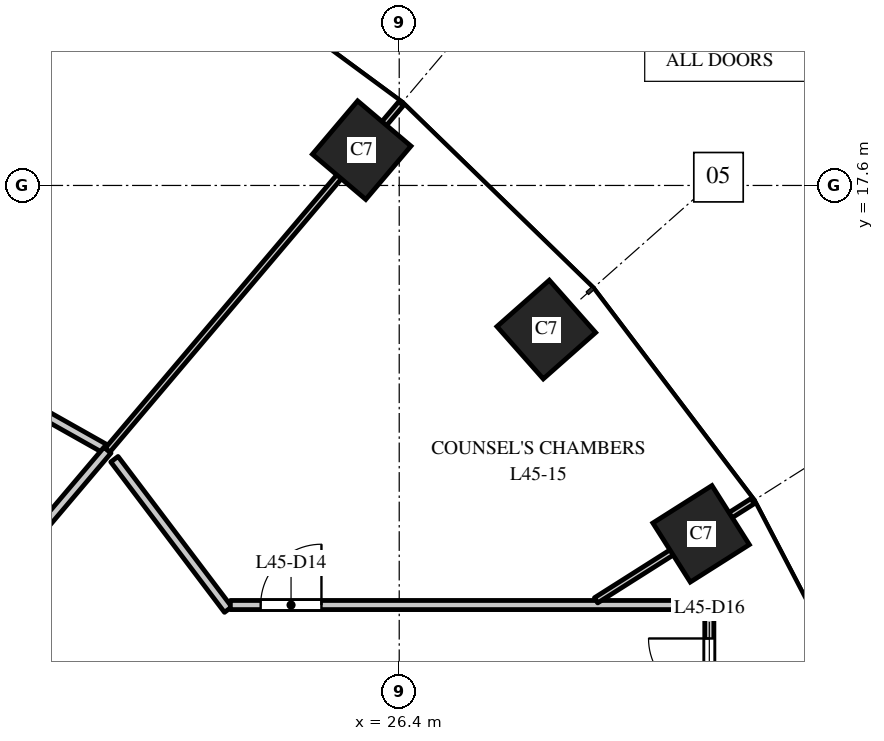
"""IFC4 building model, lengths in metres.
Left out: names, types, materials, properties, quantities, classifications, styles, units other than length and angle.
Written with IfcOpenShell. Run it as: python <this file> out.ifc"""

import sys

from ifc_helpers import new_model, si_unit, direction, frame, frame_2d, origin, origin_2d, place, context, subcontext, project, spatial, rectangle, extrude, element, fill, save


model = new_model("IFC4")
c1 = context("Model", 3, precision=1e-05, world=origin(), true_north=direction((0.0, 1.0)))
c2 = subcontext(c1, "Body", "Model", "MODEL_VIEW")
j1 = project(units=[si_unit("LENGTHUNIT", "METRE"), si_unit("PLANEANGLEUNIT", "RADIAN")], contexts=[c1])
p1 = place(None, origin())
s1 = spatial("IfcSite", under=j1, at=p1, CompositionType="ELEMENT")
p2 = place(p1, origin())
s2 = spatial("IfcBuilding", under=s1, at=p2, CompositionType="ELEMENT")
p3 = place(p2, frame((0.0, 0.0, 194.0)))
s3 = spatial("IfcBuildingStorey", under=s2, at=p3, CompositionType="ELEMENT", Elevation=194.0)
for number, where, z_axis, x_axis in (
    (1, (31.365, 11.871, 0.0), (0.0, 0.0, 1.0), (-0.535, 0.845, 0.0)),
    (2, (28.819, 15.23, 0.0), (0.0, 0.0, 1.0), (-0.663, 0.749, 0.0)),
    (3, (25.783, 18.18, 0.0), (0.0, 0.0, 1.0), (-0.763, 0.646, 0.0)),
):
    element("IfcColumn", number, at=place(p3, frame(where, z_axis=z_axis, x_axis=x_axis)), inside=s3, PredefinedType="COLUMN", context=c2, shape_type="SweptSolid", body=[
        extrude(rectangle(XDim=1.15, YDim=1.15, at=origin_2d()), origin(), (0.0, 0.0, 1.0), 4.0),
    ])
p4 = place(p3, frame((12.711, 18.258, 0.0), z_axis=(0.0, 0.0, 1.0), x_axis=(0.871190713924, -0.490944742279, 0.0)))
e4 = element("IfcWall", 4, at=p4, inside=s3, PredefinedType="PARTITIONING", context=c2, shape_type="SweptSolid", body=[
    extrude(rectangle(XDim=10.207, YDim=0.15, at=frame_2d((5.104, 0.0))), origin(), (0.0, 0.0, 1.0), 3.7),
])
p5 = place(p3, frame((19.511, 10.778, 0.0), z_axis=(0.0, 0.0, 1.0), x_axis=(0.646314086505, 0.763071491792, 0.0)))
e5 = element("IfcWall", 5, at=p5, inside=s3, PredefinedType="PARTITIONING", context=c2, shape_type="SweptSolid", body=[
    extrude(rectangle(XDim=3.237, YDim=0.15, at=frame_2d((1.618, 0.0))), origin(), (0.0, 0.0, 1.0), 3.7),
])
p6 = place(p3, frame((21.716, 13.098, 0.0), z_axis=(0.0, 0.0, 1.0), x_axis=(0.603132715751, -0.797640851004, 0.0)))
e6 = element("IfcWall", 6, at=p6, inside=s3, PredefinedType="PARTITIONING", context=c2, shape_type="SweptSolid", body=[
    extrude(rectangle(XDim=3.1, YDim=0.15, at=frame_2d((1.55, 0.0))), origin(), (0.0, 0.0, 1.0), 2.75),
])
p7 = place(p3, frame((21.603, 13.248, 0.0), z_axis=(0.0, 0.0, 1.0), x_axis=(0.646437509972, 0.762966936179, 0.0)))
e7 = element("IfcWall", 7, at=p7, inside=s3, PredefinedType="PARTITIONING", context=c2, shape_type="SweptSolid", body=[
    extrude(rectangle(XDim=7.467, YDim=0.1, at=frame_2d((3.733, 0.0))), origin(), (0.0, 0.0, 1.0), 2.9),
])
p8 = place(p3, frame((23.623, 10.7, 0.0), z_axis=(0.0, 0.0, 1.0), x_axis=(1.0, 0.0, 0.0)))
e8 = element("IfcWall", 8, at=p8, inside=s3, PredefinedType="PARTITIONING", context=c2, shape_type="SweptSolid", body=[
    extrude(rectangle(XDim=7.877, YDim=0.15, at=frame_2d((3.938, 0.0))), origin(), (0.0, 0.0, 1.0), 2.9),
])
p9 = place(p8, frame((0.498, 0.0, 0.0)))
e9 = element("IfcOpeningElement", 9, at=p9, cuts=e8, PredefinedType="OPENING", context=c2, shape_type="SweptSolid", body=[
    extrude(rectangle(XDim=1.0, YDim=2.1, at=frame_2d((0.5, 1.05))), frame((0.0, 0.085, 0.0), z_axis=(0.0, -1.0, 0.0), x_axis=(1.0, 0.0, 0.0)), (0.0, 0.0, 1.0), 0.17),
])
p10 = place(p3, frame((29.637, 10.777, 0.0), z_axis=(0.0, 0.0, 1.0), x_axis=(0.844810627195, 0.535065420467, 0.0)))
e10 = element("IfcWall", 10, at=p10, inside=s3, PredefinedType="PARTITIONING", context=c2, shape_type="SweptSolid", body=[
    extrude(rectangle(XDim=3.048, YDim=0.1, at=frame_2d((1.524, 0.0))), origin(), (0.0, 0.0, 1.0), 2.9),
])
p11 = place(p3, frame((31.5, 8.5, 0.0), z_axis=(0.0, 0.0, 1.0), x_axis=(0.0, 1.0, 0.0)))
e11 = element("IfcWall", 11, at=p11, inside=s3, PredefinedType="PARTITIONING", context=c2, shape_type="SweptSolid", body=[
    extrude(rectangle(XDim=2.2, YDim=0.15, at=frame_2d((1.1, 0.0))), origin(), (0.0, 0.0, 1.0), 2.9),
])
p12 = place(p11, frame((0.65, 0.0, 0.0)))
e12 = element("IfcOpeningElement", 12, at=p12, cuts=e11, PredefinedType="OPENING", context=c2, shape_type="SweptSolid", body=[
    extrude(rectangle(XDim=1.0, YDim=2.1, at=frame_2d((0.5, 1.05))), frame((0.0, 0.085, 0.0), z_axis=(0.0, -1.0, 0.0), x_axis=(1.0, 0.0, 0.0)), (0.0, 0.0, 1.0), 0.17),
])
p13 = place(p9, origin())
e13 = element("IfcDoor", 13, at=p13, inside=s3, OperationType="SINGLE_SWING_RIGHT", PredefinedType="DOOR", context=c2, shape_type="SweptSolid", body=[
    extrude(rectangle(XDim=1.0, YDim=2.1, at=frame_2d((0.5, 1.05))), frame((0.0, 0.025, 0.0), z_axis=(0.0, -1.0, 0.0), x_axis=(1.0, 0.0, 0.0)), (0.0, 0.0, 1.0), 0.05),
])
fill(e9, e13)
p14 = place(p12, origin())
e14 = element("IfcDoor", 14, at=p14, inside=s3, OperationType="SINGLE_SWING_RIGHT", PredefinedType="DOOR", context=c2, shape_type="SweptSolid", body=[
    extrude(rectangle(XDim=1.0, YDim=2.1, at=frame_2d((0.5, 1.05))), frame((0.0, 0.025, 0.0), z_axis=(0.0, -1.0, 0.0), x_axis=(1.0, 0.0, 0.0)), (0.0, 0.0, 1.0), 0.05),
])
fill(e12, e14)
save(model, sys.argv[1])
